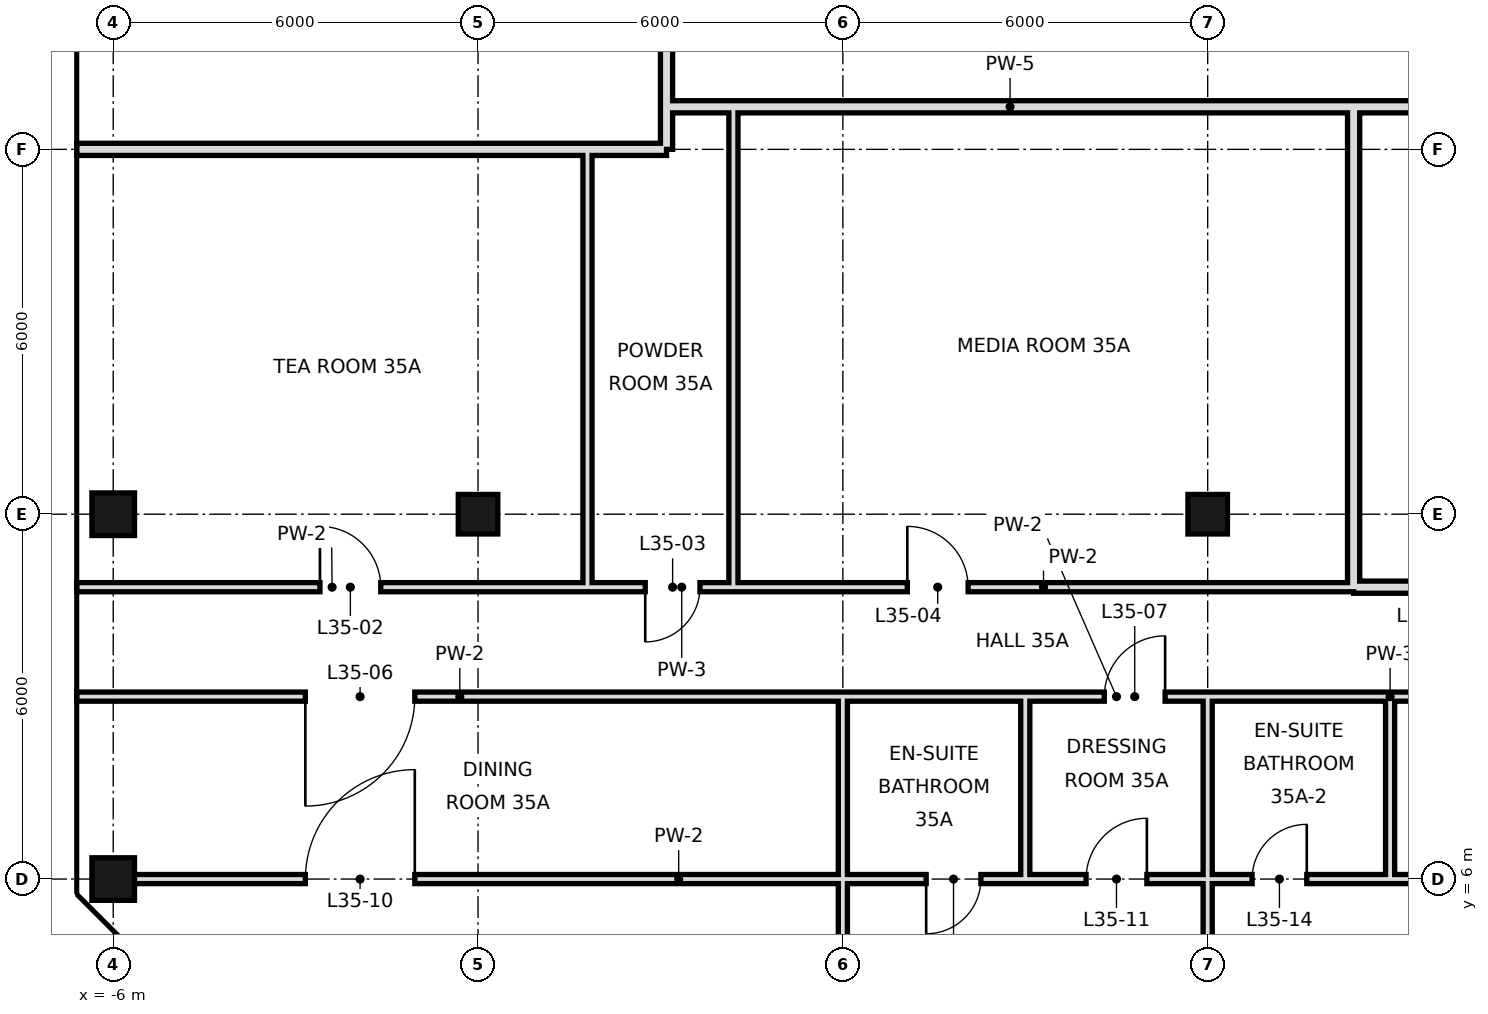
"""IFC4 building model, lengths in metres.
Left out: names, types, materials, properties, quantities, classifications, styles, units other than length and angle.
Written with IfcOpenShell. Run it as: python <this file> out.ifc"""

import sys

from ifc_helpers import new_model, si_unit, direction, frame, frame_2d, origin, origin_2d, place, context, subcontext, project, spatial, rectangle, hollow_rectangle, extrude, element, fill, save


model = new_model("IFC4")
c1 = context("Model", 3, precision=1e-05, world=origin(), true_north=direction((0.0, 1.0)))
c2 = subcontext(c1, "Body", "Model", "MODEL_VIEW")
j1 = project(units=[si_unit("LENGTHUNIT", "METRE"), si_unit("PLANEANGLEUNIT", "RADIAN")], contexts=[c1])
p1 = place(None, origin())
s1 = spatial("IfcSite", under=j1, at=p1, CompositionType="ELEMENT")
p2 = place(p1, origin())
s2 = spatial("IfcBuilding", under=s1, at=p2, CompositionType="ELEMENT")
p3 = place(p2, frame((0.0, 0.0, 154.6)))
s3 = spatial("IfcBuildingStorey", under=s2, at=p3, CompositionType="ELEMENT", Elevation=154.6)
for number, where, z_axis, x_axis in (
    (1, (-6.0, 6.0, 0.0), (0.0, 0.0, 1.0), (1.0, 0.0, 0.0)),
    (2, (-6.0, 12.0, 0.0), (0.0, 0.0, 1.0), (1.0, 0.0, 0.0)),
):
    element("IfcColumn", number, at=place(p3, frame(where, z_axis=z_axis, x_axis=x_axis)), inside=s3, PredefinedType="COLUMN", context=c2, shape_type="SweptSolid", body=[
        extrude(hollow_rectangle(XDim=0.7, YDim=0.7, WallThickness=0.036, at=origin_2d()), origin(), (0.0, 0.0, 1.0), 3.6),
    ])
for number, where, z_axis, x_axis in (
    (3, (0.0, 12.0, 0.0), (0.0, 0.0, 1.0), (1.0, 0.0, 0.0)),
    (4, (12.0, 12.0, 0.0), (0.0, 0.0, 1.0), (1.0, 0.0, 0.0)),
):
    element("IfcColumn", number, at=place(p3, frame(where, z_axis=z_axis, x_axis=x_axis)), inside=s3, PredefinedType="COLUMN", context=c2, shape_type="SweptSolid", body=[
        extrude(hollow_rectangle(XDim=0.65, YDim=0.65, WallThickness=0.032, at=origin_2d()), origin(), (0.0, 0.0, 1.0), 3.6),
    ])
p4 = place(p3, frame((1.8, 10.8, 0.0), z_axis=(0.0, 0.0, 1.0), x_axis=(0.0, 1.0, 0.0)))
e5 = element("IfcWall", 5, at=p4, inside=s3, PredefinedType="PARTITIONING", context=c2, shape_type="SweptSolid", body=[
    extrude(rectangle(XDim=7.2, YDim=0.15, at=frame_2d((3.6, 0.0))), origin(), (0.0, 0.0, 1.0), 3.42),
])
p5 = place(p3, frame((12.0, 0.0, 0.0), z_axis=(0.0, 0.0, 1.0), x_axis=(0.0, 1.0, 0.0)))
e6 = element("IfcWall", 6, at=p5, inside=s3, PredefinedType="PARTITIONING", context=c2, shape_type="SweptSolid", body=[
    extrude(rectangle(XDim=6.0, YDim=0.15, at=frame_2d((3.0, 0.0))), origin(), (0.0, 0.0, 1.0), 2.72),
])
p6 = place(p3, frame((12.0, 6.0, 0.0), z_axis=(0.0, 0.0, 1.0), x_axis=(0.0, 1.0, 0.0)))
e7 = element("IfcWall", 7, at=p6, inside=s3, PredefinedType="PARTITIONING", context=c2, shape_type="SweptSolid", body=[
    extrude(rectangle(XDim=3.0, YDim=0.15, at=frame_2d((1.5, 0.0))), origin(), (0.0, 0.0, 1.0), 2.72),
])
p7 = place(p3, frame((14.4, 10.8, 0.0), z_axis=(0.0, 0.0, 1.0), x_axis=(0.0, 1.0, 0.0)))
e8 = element("IfcWall", 8, at=p7, inside=s3, PredefinedType="SOLIDWALL", context=c2, shape_type="SweptSolid", body=[
    extrude(rectangle(XDim=7.9, YDim=0.2, at=frame_2d((3.95, 0.0))), origin(), (0.0, 0.0, 1.0), 2.72),
])
p8 = place(p3, frame((15.0, 6.0, 0.0), z_axis=(0.0, 0.0, 1.0), x_axis=(0.0, 1.0, 0.0)))
e9 = element("IfcWall", 9, at=p8, inside=s3, PredefinedType="PARTITIONING", context=c2, shape_type="SweptSolid", body=[
    extrude(rectangle(XDim=3.0, YDim=0.15, at=frame_2d((1.5, 0.0))), origin(), (0.0, 0.0, 1.0), 3.42),
])
p9 = place(p3, frame((3.1, 18.0, 0.0), z_axis=(0.0, 0.0, 1.0), x_axis=(0.0, 1.0, 0.0)))
e10 = element("IfcWall", 10, at=p9, inside=s3, PredefinedType="SOLIDWALL", context=c2, shape_type="SweptSolid", body=[
    extrude(rectangle(XDim=30.6, YDim=0.2, at=frame_2d((15.3, 0.0))), origin(), (0.0, 0.0, 1.0), 2.72),
])
p10 = place(p9, frame((20.27, 0.0, 0.0)))
e11 = element("IfcOpeningElement", 11, at=p10, cuts=e10, PredefinedType="OPENING", context=c2, shape_type="SweptSolid", body=[
    extrude(rectangle(XDim=1.2, YDim=2.4, at=frame_2d((0.6, 1.2))), frame((0.0, 0.11, 0.0), z_axis=(0.0, -1.0, 0.0), x_axis=(1.0, 0.0, 0.0)), (0.0, 0.0, 1.0), 0.22),
])
p11 = place(p3, frame((4.2, 10.8, 0.0), z_axis=(0.0, 0.0, 1.0), x_axis=(0.0, 1.0, 0.0)))
e12 = element("IfcWall", 12, at=p11, inside=s3, PredefinedType="PARTITIONING", context=c2, shape_type="SweptSolid", body=[
    extrude(rectangle(XDim=7.9, YDim=0.15, at=frame_2d((3.95, 0.0))), origin(), (0.0, 0.0, 1.0), 3.42),
])
p12 = place(p3, frame((6.0, -0.6, 0.0), z_axis=(0.0, 0.0, 1.0), x_axis=(0.0, 1.0, 0.0)))
e13 = element("IfcWall", 13, at=p12, inside=s3, PredefinedType="PARTITIONING", context=c2, shape_type="SweptSolid", body=[
    extrude(rectangle(XDim=6.6, YDim=0.15, at=frame_2d((3.3, 0.0))), origin(), (0.0, 0.0, 1.0), 2.72),
])
p13 = place(p3, frame((6.0, 6.0, 0.0), z_axis=(0.0, 0.0, 1.0), x_axis=(0.0, 1.0, 0.0)))
e14 = element("IfcWall", 14, at=p13, inside=s3, PredefinedType="PARTITIONING", context=c2, shape_type="SweptSolid", body=[
    extrude(rectangle(XDim=3.0, YDim=0.15, at=frame_2d((1.5, 0.0))), origin(), (0.0, 0.0, 1.0), 2.72),
])
p14 = place(p3, frame((9.0, 6.0, 0.0), z_axis=(0.0, 0.0, 1.0), x_axis=(0.0, 1.0, 0.0)))
e15 = element("IfcWall", 15, at=p14, inside=s3, PredefinedType="PARTITIONING", context=c2, shape_type="SweptSolid", body=[
    extrude(rectangle(XDim=3.0, YDim=0.15, at=frame_2d((1.5, 0.0))), origin(), (0.0, 0.0, 1.0), 3.42),
])
p15 = place(p3, frame((14.4, 10.8, 0.0), z_axis=(0.0, 0.0, 1.0), x_axis=(1.0, 0.0, 0.0)))
e16 = element("IfcWall", 16, at=p15, inside=s3, PredefinedType="SOLIDWALL", context=c2, shape_type="SweptSolid", body=[
    extrude(rectangle(XDim=4.8, YDim=0.2, at=frame_2d((2.4, 0.0))), origin(), (0.0, 0.0, 1.0), 2.72),
])
p16 = place(p15, frame((1.24, 0.0, 0.0)))
e17 = element("IfcOpeningElement", 17, at=p16, cuts=e16, PredefinedType="OPENING", context=c2, shape_type="SweptSolid", body=[
    extrude(rectangle(XDim=1.0, YDim=2.4, at=frame_2d((0.5, 1.2))), frame((0.0, 0.11, 0.0), z_axis=(0.0, -1.0, 0.0), x_axis=(1.0, 0.0, 0.0)), (0.0, 0.0, 1.0), 0.22),
])
p17 = place(p3, frame((-6.6, 10.8, 0.0), z_axis=(0.0, 0.0, 1.0), x_axis=(1.0, 0.0, 0.0)))
e18 = element("IfcWall", 18, at=p17, inside=s3, PredefinedType="PARTITIONING", context=c2, shape_type="SweptSolid", body=[
    extrude(rectangle(XDim=8.4, YDim=0.15, at=frame_2d((4.2, 0.0))), origin(), (0.0, 0.0, 1.0), 3.42),
])
p18 = place(p17, frame((4.0, 0.0, 0.0)))
e19 = element("IfcOpeningElement", 19, at=p18, cuts=e18, PredefinedType="OPENING", context=c2, shape_type="SweptSolid", body=[
    extrude(rectangle(XDim=1.0, YDim=2.4, at=frame_2d((0.5, 1.2))), frame((0.0, 0.085, 0.0), z_axis=(0.0, -1.0, 0.0), x_axis=(1.0, 0.0, 0.0)), (0.0, 0.0, 1.0), 0.17),
])
p19 = place(p3, frame((4.2, 10.8, 0.0), z_axis=(0.0, 0.0, 1.0), x_axis=(1.0, 0.0, 0.0)))
e20 = element("IfcWall", 20, at=p19, inside=s3, PredefinedType="PARTITIONING", context=c2, shape_type="SweptSolid", body=[
    extrude(rectangle(XDim=10.2, YDim=0.15, at=frame_2d((5.1, 0.0))), origin(), (0.0, 0.0, 1.0), 3.42),
])
p20 = place(p19, frame((2.86, 0.0, 0.0)))
e21 = element("IfcOpeningElement", 21, at=p20, cuts=e20, PredefinedType="OPENING", context=c2, shape_type="SweptSolid", body=[
    extrude(rectangle(XDim=1.0, YDim=2.4, at=frame_2d((0.5, 1.2))), frame((0.0, 0.085, 0.0), z_axis=(0.0, -1.0, 0.0), x_axis=(1.0, 0.0, 0.0)), (0.0, 0.0, 1.0), 0.17),
])
p21 = place(p3, frame((1.8, 10.8, 0.0), z_axis=(0.0, 0.0, 1.0), x_axis=(1.0, 0.0, 0.0)))
e22 = element("IfcWall", 22, at=p21, inside=s3, PredefinedType="PARTITIONING", context=c2, shape_type="SweptSolid", body=[
    extrude(rectangle(XDim=2.4, YDim=0.15, at=frame_2d((1.2, 0.0))), origin(), (0.0, 0.0, 1.0), 3.42),
])
p22 = place(p21, frame((0.95, 0.0, 0.0)))
e23 = element("IfcOpeningElement", 23, at=p22, cuts=e22, PredefinedType="OPENING", context=c2, shape_type="SweptSolid", body=[
    extrude(rectangle(XDim=0.9, YDim=2.4, at=frame_2d((0.45, 1.2))), frame((0.0, 0.085, 0.0), z_axis=(0.0, -1.0, 0.0), x_axis=(1.0, 0.0, 0.0)), (0.0, 0.0, 1.0), 0.17),
])
p23 = place(p3, frame((-6.6, 18.0, 0.0), z_axis=(0.0, 0.0, 1.0), x_axis=(1.0, 0.0, 0.0)))
e24 = element("IfcWall", 24, at=p23, inside=s3, PredefinedType="SOLIDWALL", context=c2, shape_type="SweptSolid", body=[
    extrude(rectangle(XDim=9.7, YDim=0.2, at=frame_2d((4.85, 0.0))), origin(), (0.0, 0.0, 1.0), 2.72),
])
p24 = place(p3, frame((3.1, 18.7, 0.0), z_axis=(0.0, 0.0, 1.0), x_axis=(1.0, 0.0, 0.0)))
e25 = element("IfcWall", 25, at=p24, inside=s3, PredefinedType="SOLIDWALL", context=c2, shape_type="SweptSolid", body=[
    extrude(rectangle(XDim=11.3, YDim=0.2, at=frame_2d((5.65, 0.0))), origin(), (0.0, 0.0, 1.0), 2.72),
])
p25 = place(p3, frame((14.4, 18.7, 0.0), z_axis=(0.0, 0.0, 1.0), x_axis=(1.0, 0.0, 0.0)))
e26 = element("IfcWall", 26, at=p25, inside=s3, PredefinedType="SOLIDWALL", context=c2, shape_type="SweptSolid", body=[
    extrude(rectangle(XDim=4.8, YDim=0.2, at=frame_2d((2.4, 0.0))), origin(), (0.0, 0.0, 1.0), 2.72),
])
p26 = place(p3, frame((-6.0, 6.0, 0.0), z_axis=(0.0, 0.0, 1.0), x_axis=(1.0, 0.0, 0.0)))
e27 = element("IfcWall", 27, at=p26, inside=s3, PredefinedType="PARTITIONING", context=c2, shape_type="SweptSolid", body=[
    extrude(rectangle(XDim=12.0, YDim=0.15, at=frame_2d((6.0, 0.0))), origin(), (0.0, 0.0, 1.0), 2.97),
])
p27 = place(p26, frame((3.16, 0.0, 0.0)))
e28 = element("IfcOpeningElement", 28, at=p27, cuts=e27, PredefinedType="OPENING", context=c2, shape_type="SweptSolid", body=[
    extrude(rectangle(XDim=1.8, YDim=2.4, at=frame_2d((0.9, 1.2))), frame((0.0, 0.085, 0.0), z_axis=(0.0, -1.0, 0.0), x_axis=(1.0, 0.0, 0.0)), (0.0, 0.0, 1.0), 0.17),
])
p28 = place(p3, frame((9.0, 6.0, 0.0), z_axis=(0.0, 0.0, 1.0), x_axis=(1.0, 0.0, 0.0)))
e29 = element("IfcWall", 29, at=p28, inside=s3, PredefinedType="PARTITIONING", context=c2, shape_type="SweptSolid", body=[
    extrude(rectangle(XDim=3.0, YDim=0.15, at=frame_2d((1.5, 0.0))), origin(), (0.0, 0.0, 1.0), 2.97),
])
p29 = place(p28, frame((1.0, 0.0, 0.0)))
e30 = element("IfcOpeningElement", 30, at=p29, cuts=e29, PredefinedType="OPENING", context=c2, shape_type="SweptSolid", body=[
    extrude(rectangle(XDim=1.0, YDim=2.4, at=frame_2d((0.5, 1.2))), frame((0.0, 0.085, 0.0), z_axis=(0.0, -1.0, 0.0), x_axis=(1.0, 0.0, 0.0)), (0.0, 0.0, 1.0), 0.17),
])
p30 = place(p3, frame((15.0, 6.0, 0.0), z_axis=(0.0, 0.0, 1.0), x_axis=(1.0, 0.0, 0.0)))
e31 = element("IfcWall", 31, at=p30, inside=s3, PredefinedType="PARTITIONING", context=c2, shape_type="SweptSolid", body=[
    extrude(rectangle(XDim=3.0, YDim=0.15, at=frame_2d((1.5, 0.0))), origin(), (0.0, 0.0, 1.0), 2.97),
])
p31 = place(p30, frame((1.0, 0.0, 0.0)))
e32 = element("IfcOpeningElement", 32, at=p31, cuts=e31, PredefinedType="OPENING", context=c2, shape_type="SweptSolid", body=[
    extrude(rectangle(XDim=1.0, YDim=2.4, at=frame_2d((0.5, 1.2))), frame((0.0, 0.085, 0.0), z_axis=(0.0, -1.0, 0.0), x_axis=(1.0, 0.0, 0.0)), (0.0, 0.0, 1.0), 0.17),
])
p32 = place(p3, frame((6.0, 6.0, 0.0), z_axis=(0.0, 0.0, 1.0), x_axis=(1.0, 0.0, 0.0)))
e33 = element("IfcWall", 33, at=p32, inside=s3, PredefinedType="PARTITIONING", context=c2, shape_type="SweptSolid", body=[
    extrude(rectangle(XDim=3.0, YDim=0.15, at=frame_2d((1.5, 0.0))), origin(), (0.0, 0.0, 1.0), 2.97),
])
p33 = place(p32, frame((1.37, 0.0, 0.0)))
e34 = element("IfcOpeningElement", 34, at=p33, cuts=e33, PredefinedType="OPENING", context=c2, shape_type="SweptSolid", body=[
    extrude(rectangle(XDim=0.9, YDim=2.4, at=frame_2d((0.45, 1.2))), frame((0.0, 0.085, 0.0), z_axis=(0.0, -1.0, 0.0), x_axis=(1.0, 0.0, 0.0)), (0.0, 0.0, 1.0), 0.17),
])
p34 = place(p3, frame((12.0, 6.0, 0.0), z_axis=(0.0, 0.0, 1.0), x_axis=(1.0, 0.0, 0.0)))
e35 = element("IfcWall", 35, at=p34, inside=s3, PredefinedType="PARTITIONING", context=c2, shape_type="SweptSolid", body=[
    extrude(rectangle(XDim=3.0, YDim=0.15, at=frame_2d((1.5, 0.0))), origin(), (0.0, 0.0, 1.0), 2.97),
])
p35 = place(p34, frame((0.73, 0.0, 0.0)))
e36 = element("IfcOpeningElement", 36, at=p35, cuts=e35, PredefinedType="OPENING", context=c2, shape_type="SweptSolid", body=[
    extrude(rectangle(XDim=0.9, YDim=2.4, at=frame_2d((0.45, 1.2))), frame((0.0, 0.085, 0.0), z_axis=(0.0, -1.0, 0.0), x_axis=(1.0, 0.0, 0.0)), (0.0, 0.0, 1.0), 0.17),
])
p36 = place(p3, frame((-6.6, 9.0, 0.0), z_axis=(0.0, 0.0, 1.0), x_axis=(1.0, 0.0, 0.0)))
e37 = element("IfcWall", 37, at=p36, inside=s3, PredefinedType="PARTITIONING", context=c2, shape_type="SweptSolid", body=[
    extrude(rectangle(XDim=12.6, YDim=0.15, at=frame_2d((6.3, 0.0))), origin(), (0.0, 0.0, 1.0), 3.42),
])
p37 = place(p36, frame((3.76, 0.0, 0.0)))
e38 = element("IfcOpeningElement", 38, at=p37, cuts=e37, PredefinedType="OPENING", context=c2, shape_type="SweptSolid", body=[
    extrude(rectangle(XDim=1.8, YDim=2.4, at=frame_2d((0.9, 1.2))), frame((0.0, 0.085, 0.0), z_axis=(0.0, -1.0, 0.0), x_axis=(1.0, 0.0, 0.0)), (0.0, 0.0, 1.0), 0.17),
])
p38 = place(p3, frame((9.0, 9.0, 0.0), z_axis=(0.0, 0.0, 1.0), x_axis=(1.0, 0.0, 0.0)))
e39 = element("IfcWall", 39, at=p38, inside=s3, PredefinedType="PARTITIONING", context=c2, shape_type="SweptSolid", body=[
    extrude(rectangle(XDim=3.0, YDim=0.15, at=frame_2d((1.5, 0.0))), origin(), (0.0, 0.0, 1.0), 3.42),
])
p39 = place(p38, frame((1.3, 0.0, 0.0)))
e40 = element("IfcOpeningElement", 40, at=p39, cuts=e39, PredefinedType="OPENING", context=c2, shape_type="SweptSolid", body=[
    extrude(rectangle(XDim=1.0, YDim=2.4, at=frame_2d((0.5, 1.2))), frame((0.0, 0.085, 0.0), z_axis=(0.0, -1.0, 0.0), x_axis=(1.0, 0.0, 0.0)), (0.0, 0.0, 1.0), 0.17),
])
p40 = place(p3, frame((15.0, 9.0, 0.0), z_axis=(0.0, 0.0, 1.0), x_axis=(1.0, 0.0, 0.0)))
e41 = element("IfcWall", 41, at=p40, inside=s3, PredefinedType="PARTITIONING", context=c2, shape_type="SweptSolid", body=[
    extrude(rectangle(XDim=24.6, YDim=0.15, at=frame_2d((12.3, 0.0))), origin(), (0.0, 0.0, 1.0), 3.42),
])
p41 = place(p40, frame((1.3, 0.0, 0.0)))
e42 = element("IfcOpeningElement", 42, at=p41, cuts=e41, PredefinedType="OPENING", context=c2, shape_type="SweptSolid", body=[
    extrude(rectangle(XDim=1.0, YDim=2.4, at=frame_2d((0.5, 1.2))), frame((0.0, 0.085, 0.0), z_axis=(0.0, -1.0, 0.0), x_axis=(1.0, 0.0, 0.0)), (0.0, 0.0, 1.0), 0.17),
])
p42 = place(p40, frame((5.84, 0.0, 0.0)))
e43 = element("IfcOpeningElement", 43, at=p42, cuts=e41, PredefinedType="OPENING", context=c2, shape_type="SweptSolid", body=[
    extrude(rectangle(XDim=1.8, YDim=2.4, at=frame_2d((0.9, 1.2))), frame((0.0, 0.085, 0.0), z_axis=(0.0, -1.0, 0.0), x_axis=(1.0, 0.0, 0.0)), (0.0, 0.0, 1.0), 0.17),
])
p43 = place(p40, frame((10.6, 0.0, 0.0)))
e44 = element("IfcOpeningElement", 44, at=p43, cuts=e41, PredefinedType="OPENING", context=c2, shape_type="SweptSolid", body=[
    extrude(rectangle(XDim=1.0, YDim=2.4, at=frame_2d((0.5, 1.2))), frame((0.0, 0.085, 0.0), z_axis=(0.0, -1.0, 0.0), x_axis=(1.0, 0.0, 0.0)), (0.0, 0.0, 1.0), 0.17),
])
p44 = place(p40, frame((16.6, 0.0, 0.0)))
e45 = element("IfcOpeningElement", 45, at=p44, cuts=e41, PredefinedType="OPENING", context=c2, shape_type="SweptSolid", body=[
    extrude(rectangle(XDim=1.0, YDim=2.4, at=frame_2d((0.5, 1.2))), frame((0.0, 0.085, 0.0), z_axis=(0.0, -1.0, 0.0), x_axis=(1.0, 0.0, 0.0)), (0.0, 0.0, 1.0), 0.17),
])
p45 = place(p40, frame((22.72, 0.0, 0.0)))
e46 = element("IfcOpeningElement", 46, at=p45, cuts=e41, PredefinedType="OPENING", context=c2, shape_type="SweptSolid", body=[
    extrude(rectangle(XDim=1.0, YDim=2.4, at=frame_2d((0.5, 1.2))), frame((0.0, 0.085, 0.0), z_axis=(0.0, -1.0, 0.0), x_axis=(1.0, 0.0, 0.0)), (0.0, 0.0, 1.0), 0.17),
])
for number, where, z_axis, x_axis in (
    (47, (6.0, 9.0, 0.0), (0.0, 0.0, 1.0), (1.0, 0.0, 0.0)),
    (48, (12.0, 9.0, 0.0), (0.0, 0.0, 1.0), (1.0, 0.0, 0.0)),
):
    element("IfcWall", number, at=place(p3, frame(where, z_axis=z_axis, x_axis=x_axis)), inside=s3, PredefinedType="PARTITIONING", context=c2, shape_type="SweptSolid", body=[
        extrude(rectangle(XDim=3.0, YDim=0.15, at=frame_2d((1.5, 0.0))), origin(), (0.0, 0.0, 1.0), 3.42),
    ])
p46 = place(p18, origin())
e49 = element("IfcDoor", 49, at=p46, inside=s3, OperationType="SINGLE_SWING_LEFT", PredefinedType="DOOR", context=c2, shape_type="SweptSolid", body=[
    extrude(rectangle(XDim=1.0, YDim=2.4, at=frame_2d((0.5, 1.2))), frame((0.0, 0.025, 0.0), z_axis=(0.0, -1.0, 0.0), x_axis=(1.0, 0.0, 0.0)), (0.0, 0.0, 1.0), 0.05),
])
fill(e19, e49)
p47 = place(p22, frame((0.9, 0.0, 0.0), z_axis=(0.0, 0.0, 1.0), x_axis=(-1.0, 0.0, 0.0)))
e50 = element("IfcDoor", 50, at=p47, inside=s3, OperationType="SINGLE_SWING_RIGHT", PredefinedType="DOOR", context=c2, shape_type="SweptSolid", body=[
    extrude(rectangle(XDim=0.9, YDim=2.4, at=frame_2d((0.45, 1.2))), frame((0.0, 0.025, 0.0), z_axis=(0.0, -1.0, 0.0), x_axis=(1.0, 0.0, 0.0)), (0.0, 0.0, 1.0), 0.05),
])
fill(e23, e50)
p48 = place(p20, origin())
e51 = element("IfcDoor", 51, at=p48, inside=s3, OperationType="SINGLE_SWING_LEFT", PredefinedType="DOOR", context=c2, shape_type="SweptSolid", body=[
    extrude(rectangle(XDim=1.0, YDim=2.4, at=frame_2d((0.5, 1.2))), frame((0.0, 0.025, 0.0), z_axis=(0.0, -1.0, 0.0), x_axis=(1.0, 0.0, 0.0)), (0.0, 0.0, 1.0), 0.05),
])
fill(e21, e51)
p49 = place(p37, frame((1.8, 0.0, 0.0), z_axis=(0.0, 0.0, 1.0), x_axis=(-1.0, 0.0, 0.0)))
e52 = element("IfcDoor", 52, at=p49, inside=s3, OperationType="SINGLE_SWING_RIGHT", PredefinedType="DOOR", context=c2, shape_type="SweptSolid", body=[
    extrude(rectangle(XDim=1.8, YDim=2.4, at=frame_2d((0.9, 1.2))), frame((0.0, 0.025, 0.0), z_axis=(0.0, -1.0, 0.0), x_axis=(1.0, 0.0, 0.0)), (0.0, 0.0, 1.0), 0.05),
])
fill(e38, e52)
p50 = place(p39, frame((1.0, 0.0, 0.0), z_axis=(0.0, 0.0, 1.0), x_axis=(-1.0, 0.0, 0.0)))
e53 = element("IfcDoor", 53, at=p50, inside=s3, OperationType="SINGLE_SWING_LEFT", PredefinedType="DOOR", context=c2, shape_type="SweptSolid", body=[
    extrude(rectangle(XDim=1.0, YDim=2.4, at=frame_2d((0.5, 1.2))), frame((0.0, 0.025, 0.0), z_axis=(0.0, -1.0, 0.0), x_axis=(1.0, 0.0, 0.0)), (0.0, 0.0, 1.0), 0.05),
])
fill(e40, e53)
p51 = place(p27, frame((1.8, 0.0, 0.0), z_axis=(0.0, 0.0, 1.0), x_axis=(-1.0, 0.0, 0.0)))
e54 = element("IfcDoor", 54, at=p51, inside=s3, OperationType="SINGLE_SWING_LEFT", PredefinedType="DOOR", context=c2, shape_type="SweptSolid", body=[
    extrude(rectangle(XDim=1.8, YDim=2.4, at=frame_2d((0.9, 1.2))), frame((0.0, 0.025, 0.0), z_axis=(0.0, -1.0, 0.0), x_axis=(1.0, 0.0, 0.0)), (0.0, 0.0, 1.0), 0.05),
])
fill(e28, e54)
p52 = place(p29, frame((1.0, 0.0, 0.0), z_axis=(0.0, 0.0, 1.0), x_axis=(-1.0, 0.0, 0.0)))
e55 = element("IfcDoor", 55, at=p52, inside=s3, OperationType="SINGLE_SWING_LEFT", PredefinedType="DOOR", context=c2, shape_type="SweptSolid", body=[
    extrude(rectangle(XDim=1.0, YDim=2.4, at=frame_2d((0.5, 1.2))), frame((0.0, 0.025, 0.0), z_axis=(0.0, -1.0, 0.0), x_axis=(1.0, 0.0, 0.0)), (0.0, 0.0, 1.0), 0.05),
])
fill(e30, e55)
p53 = place(p33, frame((0.9, 0.0, 0.0), z_axis=(0.0, 0.0, 1.0), x_axis=(-1.0, 0.0, 0.0)))
e56 = element("IfcDoor", 56, at=p53, inside=s3, OperationType="SINGLE_SWING_RIGHT", PredefinedType="DOOR", context=c2, shape_type="SweptSolid", body=[
    extrude(rectangle(XDim=0.9, YDim=2.4, at=frame_2d((0.45, 1.2))), frame((0.0, 0.025, 0.0), z_axis=(0.0, -1.0, 0.0), x_axis=(1.0, 0.0, 0.0)), (0.0, 0.0, 1.0), 0.05),
])
fill(e34, e56)
p54 = place(p35, frame((0.9, 0.0, 0.0), z_axis=(0.0, 0.0, 1.0), x_axis=(-1.0, 0.0, 0.0)))
e57 = element("IfcDoor", 57, at=p54, inside=s3, OperationType="SINGLE_SWING_LEFT", PredefinedType="DOOR", context=c2, shape_type="SweptSolid", body=[
    extrude(rectangle(XDim=0.9, YDim=2.4, at=frame_2d((0.45, 1.2))), frame((0.0, 0.025, 0.0), z_axis=(0.0, -1.0, 0.0), x_axis=(1.0, 0.0, 0.0)), (0.0, 0.0, 1.0), 0.05),
])
fill(e36, e57)
save(model, sys.argv[1])
